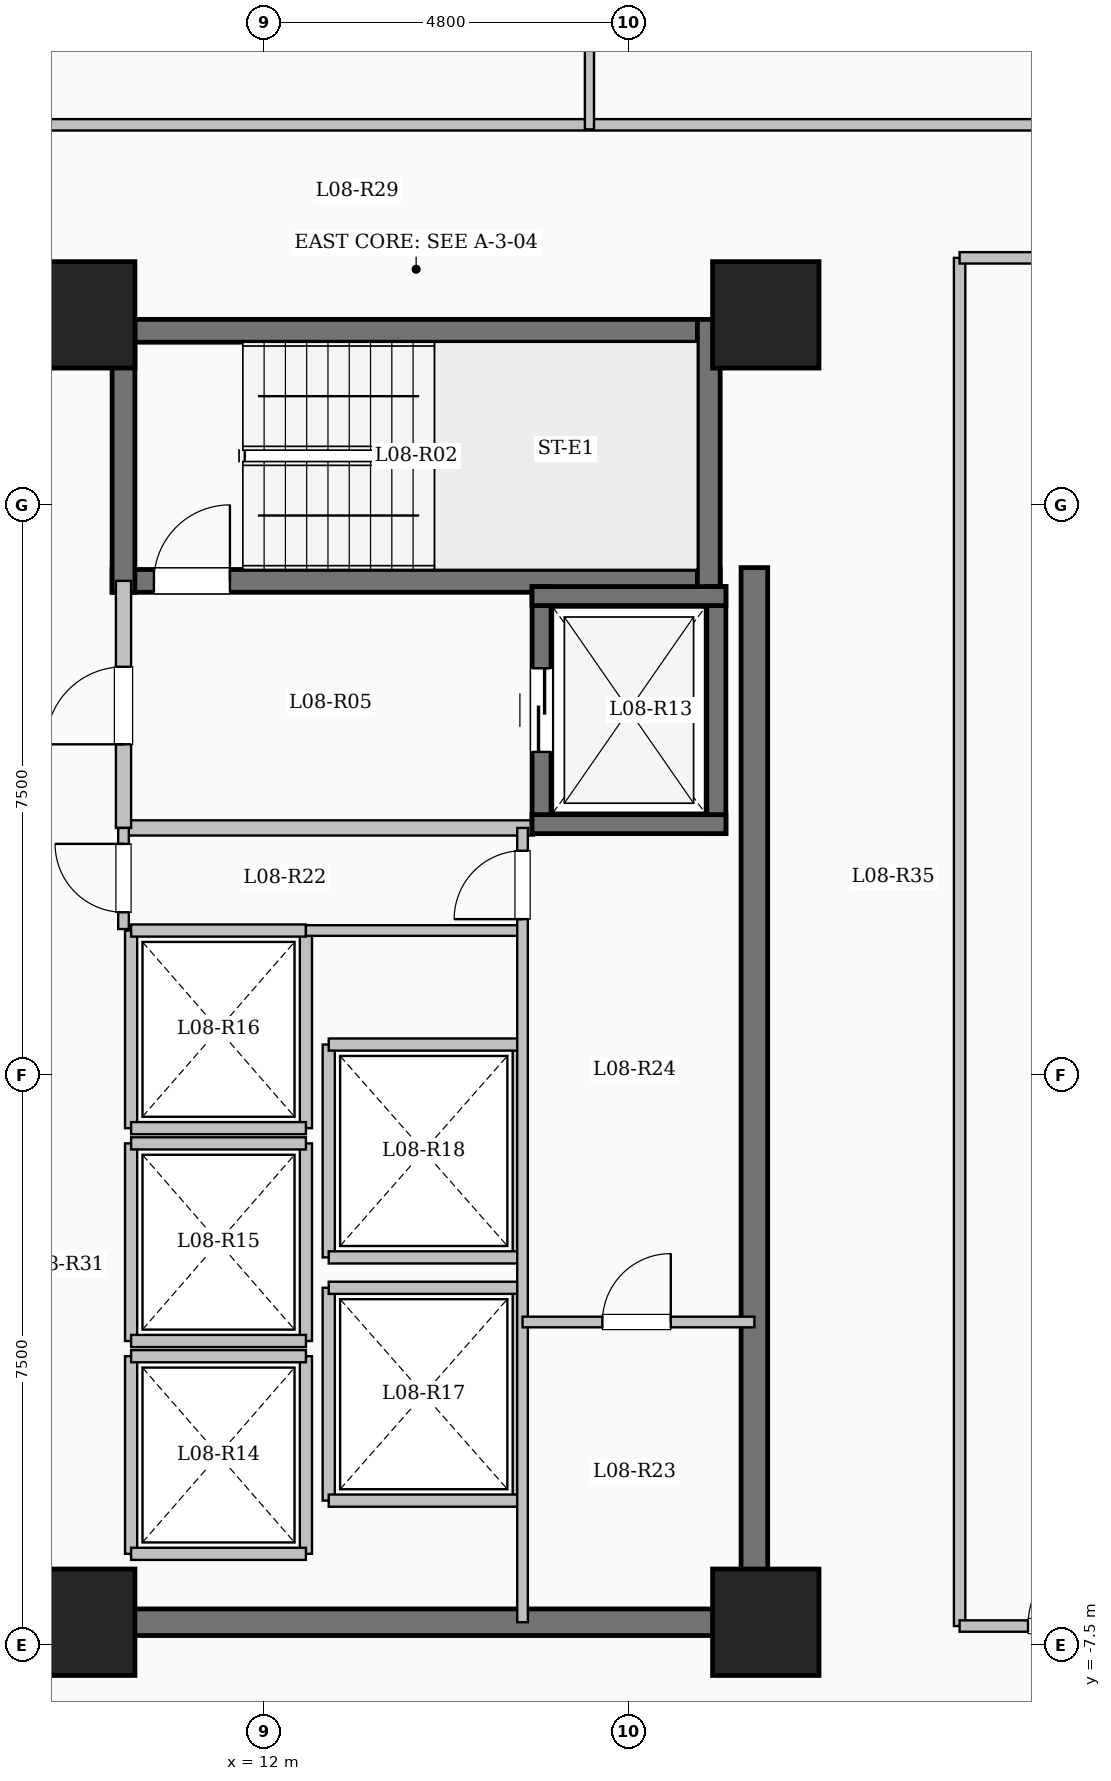
"""IFC4 building model, lengths in metres.
Left out: names, types, materials, properties, quantities, classifications, styles, units other than length and angle.
Written with IfcOpenShell. Run it as: python <this file> out.ifc"""

import sys

from ifc_helpers import new_model, si_unit, direction, frame, frame_2d, origin, origin_2d, place, context, subcontext, project, spatial, rectangle, extrude, element, fill, save


model = new_model("IFC4")
c1 = context("Model", 3, precision=1e-05, world=origin(), true_north=direction((0.0, 1.0)))
c2 = subcontext(c1, "Body", "Model", "MODEL_VIEW")
j1 = project(units=[si_unit("LENGTHUNIT", "METRE"), si_unit("PLANEANGLEUNIT", "RADIAN")], contexts=[c1])
p1 = place(None, origin())
s1 = spatial("IfcSite", under=j1, at=p1, CompositionType="ELEMENT")
p2 = place(p1, origin())
s2 = spatial("IfcBuilding", under=s1, at=p2, CompositionType="ELEMENT")
p3 = place(p2, frame((0.0, 0.0, 34.05)))
s3 = spatial("IfcBuildingStorey", under=s2, at=p3, CompositionType="ELEMENT", Elevation=34.05)
for number, where, z_axis, x_axis in (
    (1, (9.6, -7.2, 0.0), (0.0, 0.0, 1.0), (1.0, 0.0, 0.0)),
    (2, (9.6, 10.0, 0.0), (0.0, 0.0, 1.0), (1.0, 0.0, 0.0)),
    (3, (18.6, -7.2, 0.0), (0.0, 0.0, 1.0), (1.0, 0.0, 0.0)),
    (4, (18.6, 10.0, 0.0), (0.0, 0.0, 1.0), (1.0, 0.0, 0.0)),
):
    element("IfcColumn", number, at=place(p3, frame(where, z_axis=z_axis, x_axis=x_axis)), inside=s3, PredefinedType="COLUMN", context=c2, shape_type="SweptSolid", body=[
        extrude(rectangle(XDim=1.4, YDim=1.4, at=origin_2d()), origin(), (0.0, 0.0, 1.0), 3.35),
    ])
p4 = place(p3, frame((10.0, 9.79, 0.0), z_axis=(0.0, 0.0, 1.0), x_axis=(1.0, 0.0, 0.0)))
e5 = element("IfcWall", 5, at=p4, inside=s3, PredefinedType="SHEAR", context=c2, shape_type="SweptSolid", body=[
    extrude(rectangle(XDim=8.0, YDim=0.3, at=frame_2d((4.0, 0.0))), origin(), (0.0, 0.0, 1.0), 3.35),
])
p5 = place(p3, frame((10.0, 6.5, 0.0), z_axis=(0.0, 0.0, 1.0), x_axis=(1.0, 0.0, 0.0)))
e6 = element("IfcWall", 6, at=p5, inside=s3, PredefinedType="SHEAR", context=c2, shape_type="SweptSolid", body=[
    extrude(rectangle(XDim=8.0, YDim=0.3, at=frame_2d((4.0, 0.0))), origin(), (0.0, 0.0, 1.0), 3.35),
])
p6 = place(p5, frame((0.55, 0.0, 0.0)))
e7 = element("IfcOpeningElement", 7, at=p6, cuts=e6, PredefinedType="OPENING", context=c2, shape_type="SweptSolid", body=[
    extrude(rectangle(XDim=1.0, YDim=2.15, at=frame_2d((0.5, 1.075))), frame((0.0, 0.16, 0.0), z_axis=(0.0, -1.0, 0.0), x_axis=(1.0, 0.0, 0.0)), (0.0, 0.0, 1.0), 0.32),
])
for number, where, z_axis, x_axis in (
    (8, (10.15, 6.35, 0.0), (0.0, 0.0, 1.0), (0.0, 1.0, 0.0)),
    (9, (17.85, 6.35, 0.0), (0.0, 0.0, 1.0), (0.0, 1.0, 0.0)),
):
    element("IfcWall", number, at=place(p3, frame(where, z_axis=z_axis, x_axis=x_axis)), inside=s3, PredefinedType="SHEAR", context=c2, shape_type="SweptSolid", body=[
        extrude(rectangle(XDim=3.59, YDim=0.3, at=frame_2d((1.795, 0.0))), origin(), (0.0, 0.0, 1.0), 3.35),
    ])
p7 = place(p3, frame((10.15, 3.25, 0.0), z_axis=(0.0, 0.0, 1.0), x_axis=(1.0, 0.0, 0.0)))
e10 = element("IfcWall", 10, at=p7, inside=s3, PredefinedType="SOLIDWALL", context=c2, shape_type="SweptSolid", body=[
    extrude(rectangle(XDim=5.4, YDim=0.2, at=frame_2d((2.7, 0.0))), origin(), (0.0, 0.0, 1.0), 3.1),
])
p8 = place(p3, frame((10.15, 3.25, 0.0), z_axis=(0.0, 0.0, 1.0), x_axis=(0.0, 1.0, 0.0)))
e11 = element("IfcWall", 11, at=p8, inside=s3, PredefinedType="SOLIDWALL", context=c2, shape_type="SweptSolid", body=[
    extrude(rectangle(XDim=3.25, YDim=0.2, at=frame_2d((1.625, 0.0))), origin(), (0.0, 0.0, 1.0), 3.1),
])
p9 = place(p8, frame((1.1, 0.0, 0.0)))
e12 = element("IfcOpeningElement", 12, at=p9, cuts=e11, PredefinedType="OPENING", context=c2, shape_type="SweptSolid", body=[
    extrude(rectangle(XDim=1.02, YDim=2.15, at=frame_2d((0.51, 1.075))), frame((0.0, 0.11, 0.0), z_axis=(0.0, -1.0, 0.0), x_axis=(1.0, 0.0, 0.0)), (0.0, 0.0, 1.0), 0.22),
])
p10 = place(p3, frame((15.65, 3.175, 0.0), z_axis=(0.0, 0.0, 1.0), x_axis=(0.0, 1.0, 0.0)))
e13 = element("IfcWall", 13, at=p10, inside=s3, PredefinedType="SHEAR", context=c2, shape_type="SweptSolid", body=[
    extrude(rectangle(XDim=3.25, YDim=0.25, at=frame_2d((1.625, 0.0))), origin(), (0.0, 0.0, 1.0), 3.35),
])
p11 = place(p10, frame((1.075, 0.0, 0.0)))
e14 = element("IfcOpeningElement", 14, at=p11, cuts=e13, PredefinedType="OPENING", context=c2, shape_type="SweptSolid", body=[
    extrude(rectangle(XDim=1.1, YDim=2.15, at=frame_2d((0.55, 1.075))), frame((0.0, 0.135, 0.0), z_axis=(0.0, -1.0, 0.0), x_axis=(1.0, 0.0, 0.0)), (0.0, 0.0, 1.0), 0.27),
])
p12 = place(p3, frame((17.95, 3.175, 0.0), z_axis=(0.0, 0.0, 1.0), x_axis=(0.0, 1.0, 0.0)))
e15 = element("IfcWall", 15, at=p12, inside=s3, PredefinedType="SHEAR", context=c2, shape_type="SweptSolid", body=[
    extrude(rectangle(XDim=3.25, YDim=0.25, at=frame_2d((1.625, 0.0))), origin(), (0.0, 0.0, 1.0), 3.35),
])
for number, where, z_axis, x_axis in (
    (16, (15.525, 3.3, 0.0), (0.0, 0.0, 1.0), (1.0, 0.0, 0.0)),
    (17, (15.525, 6.3, 0.0), (0.0, 0.0, 1.0), (1.0, 0.0, 0.0)),
):
    element("IfcWall", number, at=place(p3, frame(where, z_axis=z_axis, x_axis=x_axis)), inside=s3, PredefinedType="SHEAR", context=c2, shape_type="SweptSolid", body=[
        extrude(rectangle(XDim=2.55, YDim=0.25, at=frame_2d((1.275, 0.0))), origin(), (0.0, 0.0, 1.0), 3.35),
    ])
for number, where, z_axis, x_axis in (
    (18, (10.25, -6.3, 0.0), (0.0, 0.0, 1.0), (0.0, 1.0, 0.0)),
    (19, (12.55, -6.3, 0.0), (0.0, 0.0, 1.0), (0.0, 1.0, 0.0)),
):
    element("IfcWall", number, at=place(p3, frame(where, z_axis=z_axis, x_axis=x_axis)), inside=s3, PredefinedType="SOLIDWALL", context=c2, shape_type="SweptSolid", body=[
        extrude(rectangle(XDim=2.6, YDim=0.16, at=frame_2d((1.3, 0.0))), origin(), (0.0, 0.0, 1.0), 3.1),
    ])
for number, where, z_axis, x_axis in (
    (20, (10.25, -6.3, 0.0), (0.0, 0.0, 1.0), (1.0, 0.0, 0.0)),
    (21, (10.25, -3.7, 0.0), (0.0, 0.0, 1.0), (1.0, 0.0, 0.0)),
):
    element("IfcWall", number, at=place(p3, frame(where, z_axis=z_axis, x_axis=x_axis)), inside=s3, PredefinedType="SOLIDWALL", context=c2, shape_type="SweptSolid", body=[
        extrude(rectangle(XDim=2.3, YDim=0.16, at=frame_2d((1.15, 0.0))), origin(), (0.0, 0.0, 1.0), 3.1),
    ])
for number, where, z_axis, x_axis in (
    (22, (10.25, -3.5, 0.0), (0.0, 0.0, 1.0), (0.0, 1.0, 0.0)),
    (23, (12.55, -3.5, 0.0), (0.0, 0.0, 1.0), (0.0, 1.0, 0.0)),
):
    element("IfcWall", number, at=place(p3, frame(where, z_axis=z_axis, x_axis=x_axis)), inside=s3, PredefinedType="SOLIDWALL", context=c2, shape_type="SweptSolid", body=[
        extrude(rectangle(XDim=2.6, YDim=0.16, at=frame_2d((1.3, 0.0))), origin(), (0.0, 0.0, 1.0), 3.1),
    ])
for number, where, z_axis, x_axis in (
    (24, (10.25, -3.5, 0.0), (0.0, 0.0, 1.0), (1.0, 0.0, 0.0)),
    (25, (10.25, -0.9, 0.0), (0.0, 0.0, 1.0), (1.0, 0.0, 0.0)),
):
    element("IfcWall", number, at=place(p3, frame(where, z_axis=z_axis, x_axis=x_axis)), inside=s3, PredefinedType="SOLIDWALL", context=c2, shape_type="SweptSolid", body=[
        extrude(rectangle(XDim=2.3, YDim=0.16, at=frame_2d((1.15, 0.0))), origin(), (0.0, 0.0, 1.0), 3.1),
    ])
for number, where, z_axis, x_axis in (
    (26, (10.25, -0.7, 0.0), (0.0, 0.0, 1.0), (0.0, 1.0, 0.0)),
    (27, (12.55, -0.7, 0.0), (0.0, 0.0, 1.0), (0.0, 1.0, 0.0)),
):
    element("IfcWall", number, at=place(p3, frame(where, z_axis=z_axis, x_axis=x_axis)), inside=s3, PredefinedType="SOLIDWALL", context=c2, shape_type="SweptSolid", body=[
        extrude(rectangle(XDim=2.6, YDim=0.16, at=frame_2d((1.3, 0.0))), origin(), (0.0, 0.0, 1.0), 3.1),
    ])
for number, where, z_axis, x_axis in (
    (28, (10.25, -0.7, 0.0), (0.0, 0.0, 1.0), (1.0, 0.0, 0.0)),
    (29, (10.25, 1.9, 0.0), (0.0, 0.0, 1.0), (1.0, 0.0, 0.0)),
):
    element("IfcWall", number, at=place(p3, frame(where, z_axis=z_axis, x_axis=x_axis)), inside=s3, PredefinedType="SOLIDWALL", context=c2, shape_type="SweptSolid", body=[
        extrude(rectangle(XDim=2.3, YDim=0.16, at=frame_2d((1.15, 0.0))), origin(), (0.0, 0.0, 1.0), 3.1),
    ])
for number, where, z_axis, x_axis in (
    (30, (12.85, -5.6, 0.0), (0.0, 0.0, 1.0), (0.0, 1.0, 0.0)),
    (31, (15.35, -5.6, 0.0), (0.0, 0.0, 1.0), (0.0, 1.0, 0.0)),
):
    element("IfcWall", number, at=place(p3, frame(where, z_axis=z_axis, x_axis=x_axis)), inside=s3, PredefinedType="SOLIDWALL", context=c2, shape_type="SweptSolid", body=[
        extrude(rectangle(XDim=2.8, YDim=0.16, at=frame_2d((1.4, 0.0))), origin(), (0.0, 0.0, 1.0), 3.1),
    ])
for number, where, z_axis, x_axis in (
    (32, (12.85, -5.6, 0.0), (0.0, 0.0, 1.0), (1.0, 0.0, 0.0)),
    (33, (12.85, -2.8, 0.0), (0.0, 0.0, 1.0), (1.0, 0.0, 0.0)),
):
    element("IfcWall", number, at=place(p3, frame(where, z_axis=z_axis, x_axis=x_axis)), inside=s3, PredefinedType="SOLIDWALL", context=c2, shape_type="SweptSolid", body=[
        extrude(rectangle(XDim=2.5, YDim=0.16, at=frame_2d((1.25, 0.0))), origin(), (0.0, 0.0, 1.0), 3.1),
    ])
for number, where, z_axis, x_axis in (
    (34, (12.85, -2.4, 0.0), (0.0, 0.0, 1.0), (0.0, 1.0, 0.0)),
    (35, (15.35, -2.4, 0.0), (0.0, 0.0, 1.0), (0.0, 1.0, 0.0)),
):
    element("IfcWall", number, at=place(p3, frame(where, z_axis=z_axis, x_axis=x_axis)), inside=s3, PredefinedType="SOLIDWALL", context=c2, shape_type="SweptSolid", body=[
        extrude(rectangle(XDim=2.8, YDim=0.16, at=frame_2d((1.4, 0.0))), origin(), (0.0, 0.0, 1.0), 3.1),
    ])
for number, where, z_axis, x_axis in (
    (36, (12.85, -2.4, 0.0), (0.0, 0.0, 1.0), (1.0, 0.0, 0.0)),
    (37, (12.85, 0.4, 0.0), (0.0, 0.0, 1.0), (1.0, 0.0, 0.0)),
):
    element("IfcWall", number, at=place(p3, frame(where, z_axis=z_axis, x_axis=x_axis)), inside=s3, PredefinedType="SOLIDWALL", context=c2, shape_type="SweptSolid", body=[
        extrude(rectangle(XDim=2.5, YDim=0.16, at=frame_2d((1.25, 0.0))), origin(), (0.0, 0.0, 1.0), 3.1),
    ])
p13 = place(p3, frame((18.45, -7.375, 0.0), z_axis=(0.0, 0.0, 1.0), x_axis=(0.0, 1.0, 0.0)))
e38 = element("IfcWall", 38, at=p13, inside=s3, PredefinedType="SHEAR", context=c2, shape_type="SweptSolid", body=[
    extrude(rectangle(XDim=14.05, YDim=0.35, at=frame_2d((7.025, 0.0))), origin(), (0.0, 0.0, 1.0), 3.35),
])
p14 = place(p3, frame((10.075, -7.2, 0.0), z_axis=(0.0, 0.0, 1.0), x_axis=(1.0, 0.0, 0.0)))
e39 = element("IfcWall", 39, at=p14, inside=s3, PredefinedType="SHEAR", context=c2, shape_type="SweptSolid", body=[
    extrude(rectangle(XDim=8.55, YDim=0.35, at=frame_2d((4.275, 0.0))), origin(), (0.0, 0.0, 1.0), 3.35),
])
p15 = place(p3, frame((12.55, 1.9, 0.0), z_axis=(0.0, 0.0, 1.0), x_axis=(1.0, 0.0, 0.0)))
e40 = element("IfcWall", 40, at=p15, inside=s3, PredefinedType="PARTITIONING", context=c2, shape_type="SweptSolid", body=[
    extrude(rectangle(XDim=2.85, YDim=0.14, at=frame_2d((1.425, 0.0))), origin(), (0.0, 0.0, 1.0), 3.1),
])
p16 = place(p3, frame((10.15, 1.92, 0.0), z_axis=(0.0, 0.0, 1.0), x_axis=(0.0, 1.0, 0.0)))
e41 = element("IfcWall", 41, at=p16, inside=s3, PredefinedType="PARTITIONING", context=c2, shape_type="SweptSolid", body=[
    extrude(rectangle(XDim=1.33, YDim=0.14, at=frame_2d((0.665, 0.0))), origin(), (0.0, 0.0, 1.0), 3.1),
])
p17 = place(p16, frame((0.22, 0.0, 0.0)))
e42 = element("IfcOpeningElement", 42, at=p17, cuts=e41, PredefinedType="OPENING", context=c2, shape_type="SweptSolid", body=[
    extrude(rectangle(XDim=0.9, YDim=2.08, at=frame_2d((0.45, 1.04))), frame((0.0, 0.08, 0.0), z_axis=(0.0, -1.0, 0.0), x_axis=(1.0, 0.0, 0.0)), (0.0, 0.0, 1.0), 0.16),
])
p18 = place(p3, frame((15.4, -7.2, 0.0), z_axis=(0.0, 0.0, 1.0), x_axis=(0.0, 1.0, 0.0)))
e43 = element("IfcWall", 43, at=p18, inside=s3, PredefinedType="PARTITIONING", context=c2, shape_type="SweptSolid", body=[
    extrude(rectangle(XDim=10.45, YDim=0.14, at=frame_2d((5.225, 0.0))), origin(), (0.0, 0.0, 1.0), 3.1),
])
p19 = place(p18, frame((9.25, 0.0, 0.0)))
e44 = element("IfcOpeningElement", 44, at=p19, cuts=e43, PredefinedType="OPENING", context=c2, shape_type="SweptSolid", body=[
    extrude(rectangle(XDim=0.9, YDim=2.08, at=frame_2d((0.45, 1.04))), frame((0.0, 0.08, 0.0), z_axis=(0.0, -1.0, 0.0), x_axis=(1.0, 0.0, 0.0)), (0.0, 0.0, 1.0), 0.16),
])
p20 = place(p3, frame((15.4, -3.25, 0.0), z_axis=(0.0, 0.0, 1.0), x_axis=(1.0, 0.0, 0.0)))
e45 = element("IfcWall", 45, at=p20, inside=s3, PredefinedType="PARTITIONING", context=c2, shape_type="SweptSolid", body=[
    extrude(rectangle(XDim=3.05, YDim=0.14, at=frame_2d((1.525, 0.0))), origin(), (0.0, 0.0, 1.0), 3.1),
])
p21 = place(p20, frame((1.05, 0.0, 0.0)))
e46 = element("IfcOpeningElement", 46, at=p21, cuts=e45, PredefinedType="OPENING", context=c2, shape_type="SweptSolid", body=[
    extrude(rectangle(XDim=0.9, YDim=2.08, at=frame_2d((0.45, 1.04))), frame((0.0, 0.08, 0.0), z_axis=(0.0, -1.0, 0.0), x_axis=(1.0, 0.0, 0.0)), (0.0, 0.0, 1.0), 0.16),
])
p22 = place(p3, frame((3.85, 12.5, 0.0), z_axis=(0.0, 0.0, 1.0), x_axis=(1.0, 0.0, 0.0)))
e47 = element("IfcWall", 47, at=p22, inside=s3, PredefinedType="PARTITIONING", context=c2, shape_type="SweptSolid", body=[
    extrude(rectangle(XDim=18.7, YDim=0.15, at=frame_2d((9.35, 0.0))), origin(), (0.0, 0.0, 1.0), 3.1),
])
p23 = place(p22, frame((0.7, 0.0, 0.0)))
e48 = element("IfcOpeningElement", 48, at=p23, cuts=e47, PredefinedType="OPENING", context=c2, shape_type="SweptSolid", body=[
    extrude(rectangle(XDim=0.96, YDim=2.15, at=frame_2d((0.48, 1.075))), frame((0.0, 0.085, 0.0), z_axis=(0.0, -1.0, 0.0), x_axis=(1.0, 0.0, 0.0)), (0.0, 0.0, 1.0), 0.17),
])
p24 = place(p3, frame((21.15, -7.25, 0.0), z_axis=(0.0, 0.0, 1.0), x_axis=(0.0, 1.0, 0.0)))
e49 = element("IfcWall", 49, at=p24, inside=s3, PredefinedType="PARTITIONING", context=c2, shape_type="SweptSolid", body=[
    extrude(rectangle(XDim=18.0, YDim=0.15, at=frame_2d((9.0, 0.0))), origin(), (0.0, 0.0, 1.0), 2.585),
])
p25 = place(p3, frame((16.28, 12.44, 0.0), z_axis=(0.0, 0.0, 1.0), x_axis=(0.0, 1.0, 0.0)))
e50 = element("IfcWall", 50, at=p25, inside=s3, PredefinedType="PARTITIONING", context=c2, shape_type="SweptSolid", body=[
    extrude(rectangle(XDim=2.79, YDim=0.12, at=frame_2d((1.395, 0.0))), origin(), (0.0, 0.0, 1.0), 3.1),
])
p26 = place(p3, frame((21.15, -7.25, 0.0), z_axis=(0.0, 0.0, 1.0), x_axis=(1.0, 0.0, 0.0)))
e51 = element("IfcWall", 51, at=p26, inside=s3, PredefinedType="PARTITIONING", context=c2, shape_type="SweptSolid", body=[
    extrude(rectangle(XDim=7.53, YDim=0.15, at=frame_2d((3.765, 0.0))), origin(), (0.0, 0.0, 1.0), 3.1),
])
p27 = place(p26, frame((0.9, 0.0, 0.0)))
e52 = element("IfcOpeningElement", 52, at=p27, cuts=e51, PredefinedType="OPENING", context=c2, shape_type="SweptSolid", body=[
    extrude(rectangle(XDim=1.08, YDim=2.15, at=frame_2d((0.54, 1.075))), frame((0.0, 0.085, 0.0), z_axis=(0.0, -1.0, 0.0), x_axis=(1.0, 0.0, 0.0)), (0.0, 0.0, 1.0), 0.17),
])
p28 = place(p3, frame((21.15, 10.75, 0.0), z_axis=(0.0, 0.0, 1.0), x_axis=(1.0, 0.0, 0.0)))
e53 = element("IfcWall", 53, at=p28, inside=s3, PredefinedType="PARTITIONING", context=c2, shape_type="SweptSolid", body=[
    extrude(rectangle(XDim=7.53, YDim=0.15, at=frame_2d((3.765, 0.0))), origin(), (0.0, 0.0, 1.0), 3.1),
])
p29 = place(p6, origin())
e54 = element("IfcDoor", 54, at=p29, inside=s3, OperationType="SINGLE_SWING_RIGHT", PredefinedType="DOOR", context=c2, shape_type="SweptSolid", body=[
    extrude(rectangle(XDim=1.0, YDim=2.15, at=frame_2d((0.5, 1.075))), frame((0.0, 0.025, 0.0), z_axis=(0.0, -1.0, 0.0), x_axis=(1.0, 0.0, 0.0)), (0.0, 0.0, 1.0), 0.05),
])
fill(e7, e54)
p30 = place(p9, origin())
e55 = element("IfcDoor", 55, at=p30, inside=s3, OperationType="SINGLE_SWING_LEFT", PredefinedType="DOOR", context=c2, shape_type="SweptSolid", body=[
    extrude(rectangle(XDim=1.02, YDim=2.15, at=frame_2d((0.51, 1.075))), frame((0.0, 0.025, 0.0), z_axis=(0.0, -1.0, 0.0), x_axis=(1.0, 0.0, 0.0)), (0.0, 0.0, 1.0), 0.05),
])
fill(e12, e55)
p31 = place(p11, origin())
e56 = element("IfcDoor", 56, at=p31, inside=s3, OperationType="SLIDING_TO_LEFT", PredefinedType="DOOR", context=c2, shape_type="SweptSolid", body=[
    extrude(rectangle(XDim=1.1, YDim=2.15, at=frame_2d((0.55, 1.075))), frame((0.0, 0.025, 0.0), z_axis=(0.0, -1.0, 0.0), x_axis=(1.0, 0.0, 0.0)), (0.0, 0.0, 1.0), 0.05),
])
fill(e14, e56)
p32 = place(p17, origin())
e57 = element("IfcDoor", 57, at=p32, inside=s3, OperationType="SINGLE_SWING_RIGHT", PredefinedType="DOOR", context=c2, shape_type="SweptSolid", body=[
    extrude(rectangle(XDim=0.9, YDim=2.08, at=frame_2d((0.45, 1.04))), frame((0.0, 0.025, 0.0), z_axis=(0.0, -1.0, 0.0), x_axis=(1.0, 0.0, 0.0)), (0.0, 0.0, 1.0), 0.05),
])
fill(e42, e57)
p33 = place(p19, origin())
e58 = element("IfcDoor", 58, at=p33, inside=s3, OperationType="SINGLE_SWING_LEFT", PredefinedType="DOOR", context=c2, shape_type="SweptSolid", body=[
    extrude(rectangle(XDim=0.9, YDim=2.08, at=frame_2d((0.45, 1.04))), frame((0.0, 0.025, 0.0), z_axis=(0.0, -1.0, 0.0), x_axis=(1.0, 0.0, 0.0)), (0.0, 0.0, 1.0), 0.05),
])
fill(e44, e58)
p34 = place(p21, origin())
e59 = element("IfcDoor", 59, at=p34, inside=s3, OperationType="SINGLE_SWING_RIGHT", PredefinedType="DOOR", context=c2, shape_type="SweptSolid", body=[
    extrude(rectangle(XDim=0.9, YDim=2.08, at=frame_2d((0.45, 1.04))), frame((0.0, 0.025, 0.0), z_axis=(0.0, -1.0, 0.0), x_axis=(1.0, 0.0, 0.0)), (0.0, 0.0, 1.0), 0.05),
])
fill(e46, e59)
p35 = place(p27, origin())
e60 = element("IfcDoor", 60, at=p35, inside=s3, OperationType="SINGLE_SWING_RIGHT", PredefinedType="DOOR", context=c2, shape_type="SweptSolid", body=[
    extrude(rectangle(XDim=1.08, YDim=2.15, at=frame_2d((0.54, 1.075))), frame((0.0, 0.025, 0.0), z_axis=(0.0, -1.0, 0.0), x_axis=(1.0, 0.0, 0.0)), (0.0, 0.0, 1.0), 0.05),
])
fill(e52, e60)
save(model, sys.argv[1])
